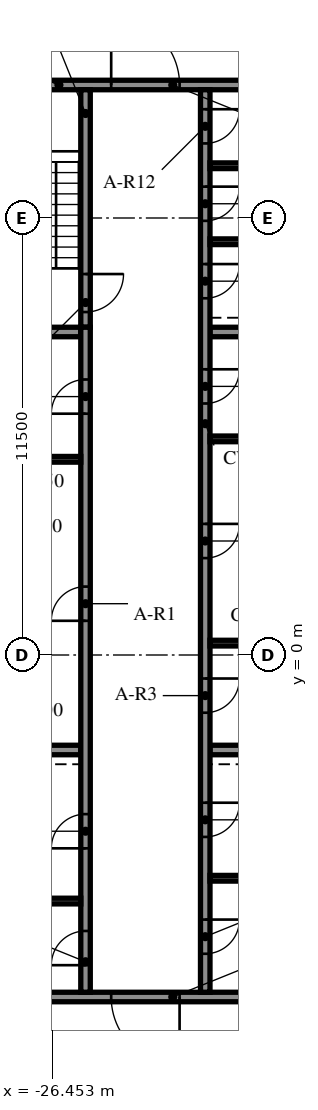
"""IFC4 building model, lengths in metres.
Left out: names, types, materials, properties, quantities, classifications, styles, units other than length and angle.
Written with IfcOpenShell. Run it as: python <this file> out.ifc"""

import sys

from ifc_helpers import new_model, si_unit, direction, frame, frame_2d, origin, place, context, subcontext, project, spatial, rectangle, extrude, element, fill, save


model = new_model("IFC4")
c1 = context("Model", 3, precision=1e-05, world=origin(), true_north=direction((0.0, 1.0)))
c2 = subcontext(c1, "Body", "Model", "MODEL_VIEW")
j1 = project(units=[si_unit("LENGTHUNIT", "METRE"), si_unit("PLANEANGLEUNIT", "RADIAN")], contexts=[c1])
p1 = place(None, origin())
s1 = spatial("IfcSite", under=j1, at=p1, CompositionType="ELEMENT")
p2 = place(p1, origin())
s2 = spatial("IfcBuilding", under=s1, at=p2, CompositionType="ELEMENT")
p3 = place(p2, frame((0.0, 0.0, 182.0)))
s3 = spatial("IfcBuildingStorey", under=s2, at=p3, CompositionType="ELEMENT", Elevation=182.0)
p4 = place(p3, frame((-19.45, -9.0, 0.0), z_axis=(0.0, 0.0, 1.0), x_axis=(-1.0, 0.0, 0.0)))
e1 = element("IfcWall", 1, at=p4, inside=s3, PredefinedType="SOLIDWALL", context=c2, shape_type="SweptSolid", body=[
    extrude(rectangle(XDim=9.1, YDim=0.25, at=frame_2d((4.55, 0.0))), origin(), (0.0, 0.0, 1.0), 3.46),
])
p5 = place(p4, frame((3.65, 0.0, 0.0)))
e2 = element("IfcOpeningElement", 2, at=p5, cuts=e1, PredefinedType="OPENING", context=c2, shape_type="SweptSolid", body=[
    extrude(rectangle(XDim=1.8, YDim=2.1, at=frame_2d((0.9, 1.05))), frame((0.0, 0.135, 0.0), z_axis=(0.0, -1.0, 0.0), x_axis=(1.0, 0.0, 0.0)), (0.0, 0.0, 1.0), 0.27),
])
p6 = place(p3, frame((-28.55, 15.0, 0.0), z_axis=(0.0, 0.0, 1.0), x_axis=(1.0, 0.0, 0.0)))
e3 = element("IfcWall", 3, at=p6, inside=s3, PredefinedType="SOLIDWALL", context=c2, shape_type="SweptSolid", body=[
    extrude(rectangle(XDim=9.1, YDim=0.25, at=frame_2d((4.55, 0.0))), origin(), (0.0, 0.0, 1.0), 3.46),
])
p7 = place(p6, frame((3.65, 0.0, 0.0)))
e4 = element("IfcOpeningElement", 4, at=p7, cuts=e3, PredefinedType="OPENING", context=c2, shape_type="SweptSolid", body=[
    extrude(rectangle(XDim=1.8, YDim=2.1, at=frame_2d((0.9, 1.05))), frame((0.0, 0.135, 0.0), z_axis=(0.0, -1.0, 0.0), x_axis=(1.0, 0.0, 0.0)), (0.0, 0.0, 1.0), 0.27),
])
p8 = place(p3, frame((-25.575, -8.875, 0.0), z_axis=(0.0, 0.0, 1.0), x_axis=(0.0, 1.0, 0.0)))
e5 = element("IfcWall", 5, at=p8, inside=s3, PredefinedType="SOLIDWALL", context=c2, shape_type="SweptSolid", body=[
    extrude(rectangle(XDim=17.5, YDim=0.25, at=frame_2d((8.75, 0.0))), origin(), (0.0, 0.0, 1.0), 3.46),
])
p9 = place(p8, frame((9.775, 0.0, 0.0)))
e6 = element("IfcOpeningElement", 6, at=p9, cuts=e5, PredefinedType="OPENING", context=c2, shape_type="SweptSolid", body=[
    extrude(rectangle(XDim=0.9, YDim=2.1, at=frame_2d((0.45, 1.05))), frame((0.0, 0.135, 0.0), z_axis=(0.0, -1.0, 0.0), x_axis=(1.0, 0.0, 0.0)), (0.0, 0.0, 1.0), 0.27),
])
p10 = place(p8, frame((15.225, 0.0, 0.0)))
e7 = element("IfcOpeningElement", 7, at=p10, cuts=e5, PredefinedType="OPENING", context=c2, shape_type="SweptSolid", body=[
    extrude(rectangle(XDim=0.9, YDim=2.1, at=frame_2d((0.45, 1.05))), frame((0.0, 0.135, 0.0), z_axis=(0.0, -1.0, 0.0), x_axis=(1.0, 0.0, 0.0)), (0.0, 0.0, 1.0), 0.27),
])
p11 = place(p8, frame((0.712, 0.0, 0.0)))
e8 = element("IfcOpeningElement", 8, at=p11, cuts=e5, PredefinedType="OPENING", context=c2, shape_type="SweptSolid", body=[
    extrude(rectangle(XDim=0.9, YDim=2.1, at=frame_2d((0.45, 1.05))), frame((0.0, 0.135, 0.0), z_axis=(0.0, -1.0, 0.0), x_axis=(1.0, 0.0, 0.0)), (0.0, 0.0, 1.0), 0.27),
])
p12 = place(p8, frame((3.788, 0.0, 0.0)))
e9 = element("IfcOpeningElement", 9, at=p12, cuts=e5, PredefinedType="OPENING", context=c2, shape_type="SweptSolid", body=[
    extrude(rectangle(XDim=0.9, YDim=2.1, at=frame_2d((0.45, 1.05))), frame((0.0, 0.135, 0.0), z_axis=(0.0, -1.0, 0.0), x_axis=(1.0, 0.0, 0.0)), (0.0, 0.0, 1.0), 0.27),
])
p13 = place(p3, frame((-25.575, 14.875, 0.0), z_axis=(0.0, 0.0, 1.0), x_axis=(0.0, -1.0, 0.0)))
e10 = element("IfcWall", 10, at=p13, inside=s3, PredefinedType="SOLIDWALL", context=c2, shape_type="SweptSolid", body=[
    extrude(rectangle(XDim=6.25, YDim=0.25, at=frame_2d((3.125, 0.0))), origin(), (0.0, 0.0, 1.0), 3.46),
])
p14 = place(p13, frame((4.85, 0.0, 0.0)))
e11 = element("IfcOpeningElement", 11, at=p14, cuts=e10, PredefinedType="OPENING", context=c2, shape_type="SweptSolid", body=[
    extrude(rectangle(XDim=1.0, YDim=2.1, at=frame_2d((0.5, 1.05))), frame((0.0, 0.135, 0.0), z_axis=(0.0, -1.0, 0.0), x_axis=(1.0, 0.0, 0.0)), (0.0, 0.0, 1.0), 0.27),
])
p15 = place(p3, frame((-22.425, 14.875, 0.0), z_axis=(0.0, 0.0, 1.0), x_axis=(0.0, -1.0, 0.0)))
e12 = element("IfcWall", 12, at=p15, inside=s3, PredefinedType="SOLIDWALL", context=c2, shape_type="SweptSolid", body=[
    extrude(rectangle(XDim=23.75, YDim=0.25, at=frame_2d((11.875, 0.0))), origin(), (0.0, 0.0, 1.0), 3.46),
])
p16 = place(p15, frame((15.494, 0.0, 0.0)))
e13 = element("IfcOpeningElement", 13, at=p16, cuts=e12, PredefinedType="OPENING", context=c2, shape_type="SweptSolid", body=[
    extrude(rectangle(XDim=0.9, YDim=2.1, at=frame_2d((0.45, 1.05))), frame((0.0, 0.135, 0.0), z_axis=(0.0, -1.0, 0.0), x_axis=(1.0, 0.0, 0.0)), (0.0, 0.0, 1.0), 0.27),
])
p17 = place(p15, frame((11.425, 0.0, 0.0)))
e14 = element("IfcOpeningElement", 14, at=p17, cuts=e12, PredefinedType="OPENING", context=c2, shape_type="SweptSolid", body=[
    extrude(rectangle(XDim=0.9, YDim=2.1, at=frame_2d((0.45, 1.05))), frame((0.0, 0.135, 0.0), z_axis=(0.0, -1.0, 0.0), x_axis=(1.0, 0.0, 0.0)), (0.0, 0.0, 1.0), 0.27),
])
p18 = place(p15, frame((7.356, 0.0, 0.0)))
e15 = element("IfcOpeningElement", 15, at=p18, cuts=e12, PredefinedType="OPENING", context=c2, shape_type="SweptSolid", body=[
    extrude(rectangle(XDim=0.9, YDim=2.1, at=frame_2d((0.45, 1.05))), frame((0.0, 0.135, 0.0), z_axis=(0.0, -1.0, 0.0), x_axis=(1.0, 0.0, 0.0)), (0.0, 0.0, 1.0), 0.27),
])
p19 = place(p15, frame((21.837, 0.0, 0.0)))
e16 = element("IfcOpeningElement", 16, at=p19, cuts=e12, PredefinedType="OPENING", context=c2, shape_type="SweptSolid", body=[
    extrude(rectangle(XDim=0.9, YDim=2.1, at=frame_2d((0.45, 1.05))), frame((0.0, 0.135, 0.0), z_axis=(0.0, -1.0, 0.0), x_axis=(1.0, 0.0, 0.0)), (0.0, 0.0, 1.0), 0.27),
])
p20 = place(p15, frame((18.762, 0.0, 0.0)))
e17 = element("IfcOpeningElement", 17, at=p20, cuts=e12, PredefinedType="OPENING", context=c2, shape_type="SweptSolid", body=[
    extrude(rectangle(XDim=0.9, YDim=2.1, at=frame_2d((0.45, 1.05))), frame((0.0, 0.135, 0.0), z_axis=(0.0, -1.0, 0.0), x_axis=(1.0, 0.0, 0.0)), (0.0, 0.0, 1.0), 0.27),
])
p21 = place(p15, frame((4.587, 0.0, 0.0)))
e18 = element("IfcOpeningElement", 18, at=p21, cuts=e12, PredefinedType="OPENING", context=c2, shape_type="SweptSolid", body=[
    extrude(rectangle(XDim=0.9, YDim=2.1, at=frame_2d((0.45, 1.05))), frame((0.0, 0.135, 0.0), z_axis=(0.0, -1.0, 0.0), x_axis=(1.0, 0.0, 0.0)), (0.0, 0.0, 1.0), 0.27),
])
p22 = place(p15, frame((2.55, 0.0, 0.0)))
e19 = element("IfcOpeningElement", 19, at=p22, cuts=e12, PredefinedType="OPENING", context=c2, shape_type="SweptSolid", body=[
    extrude(rectangle(XDim=0.9, YDim=2.1, at=frame_2d((0.45, 1.05))), frame((0.0, 0.135, 0.0), z_axis=(0.0, -1.0, 0.0), x_axis=(1.0, 0.0, 0.0)), (0.0, 0.0, 1.0), 0.27),
])
p23 = place(p15, frame((0.512, 0.0, 0.0)))
e20 = element("IfcOpeningElement", 20, at=p23, cuts=e12, PredefinedType="OPENING", context=c2, shape_type="SweptSolid", body=[
    extrude(rectangle(XDim=0.9, YDim=2.1, at=frame_2d((0.45, 1.05))), frame((0.0, 0.135, 0.0), z_axis=(0.0, -1.0, 0.0), x_axis=(1.0, 0.0, 0.0)), (0.0, 0.0, 1.0), 0.27),
])
for number, where, z_axis, x_axis in (
    (21, (-28.55, -2.5, 0.0), (0.0, 0.0, 1.0), (1.0, 0.0, 0.0)),
    (22, (-28.55, 8.5, 0.0), (0.0, 0.0, 1.0), (1.0, 0.0, 0.0)),
    (23, (-22.3, -2.5, 0.0), (0.0, 0.0, 1.0), (1.0, 0.0, 0.0)),
    (24, (-22.3, 8.5, 0.0), (0.0, 0.0, 1.0), (1.0, 0.0, 0.0)),
):
    element("IfcWall", number, at=place(p3, frame(where, z_axis=z_axis, x_axis=x_axis)), inside=s3, PredefinedType="SOLIDWALL", context=c2, shape_type="SweptSolid", body=[
        extrude(rectangle(XDim=2.85, YDim=0.25, at=frame_2d((1.425, 0.0))), origin(), (0.0, 0.0, 1.0), 3.46),
    ])
for number, where, z_axis, x_axis in (
    (25, (-28.55, 5.15, 0.0), (0.0, 0.0, 1.0), (1.0, 0.0, 0.0)),
    (26, (-22.3, 0.312, 0.0), (0.0, 0.0, 1.0), (1.0, 0.0, 0.0)),
    (27, (-22.3, 5.688, 0.0), (0.0, 0.0, 1.0), (1.0, 0.0, 0.0)),
    (28, (-28.55, -6.475, 0.0), (0.0, 0.0, 1.0), (1.0, 0.0, 0.0)),
    (29, (-22.3, -5.875, 0.0), (0.0, 0.0, 1.0), (1.0, 0.0, 0.0)),
    (30, (-22.3, 10.875, 0.0), (0.0, 0.0, 1.0), (1.0, 0.0, 0.0)),
    (31, (-22.3, 12.875, 0.0), (0.0, 0.0, 1.0), (1.0, 0.0, 0.0)),
):
    element("IfcWall", number, at=place(p3, frame(where, z_axis=z_axis, x_axis=x_axis)), inside=s3, PredefinedType="PARTITIONING", context=c2, shape_type="SweptSolid", body=[
        extrude(rectangle(XDim=2.85, YDim=0.15, at=frame_2d((1.425, 0.0))), origin(), (0.0, 0.0, 1.0), 3.46),
    ])
p24 = place(p5, origin())
e32 = element("IfcDoor", 32, at=p24, inside=s3, OperationType="DOUBLE_DOOR_SINGLE_SWING", PredefinedType="DOOR", context=c2, shape_type="SweptSolid", body=[
    extrude(rectangle(XDim=1.8, YDim=2.1, at=frame_2d((0.9, 1.05))), frame((0.0, 0.025, 0.0), z_axis=(0.0, -1.0, 0.0), x_axis=(1.0, 0.0, 0.0)), (0.0, 0.0, 1.0), 0.05),
])
fill(e2, e32)
p25 = place(p7, origin())
e33 = element("IfcDoor", 33, at=p25, inside=s3, OperationType="DOUBLE_DOOR_SINGLE_SWING", PredefinedType="DOOR", context=c2, shape_type="SweptSolid", body=[
    extrude(rectangle(XDim=1.8, YDim=2.1, at=frame_2d((0.9, 1.05))), frame((0.0, 0.025, 0.0), z_axis=(0.0, -1.0, 0.0), x_axis=(1.0, 0.0, 0.0)), (0.0, 0.0, 1.0), 0.05),
])
fill(e4, e33)
p26 = place(p9, origin())
e34 = element("IfcDoor", 34, at=p26, inside=s3, OperationType="SINGLE_SWING_LEFT", PredefinedType="DOOR", context=c2, shape_type="SweptSolid", body=[
    extrude(rectangle(XDim=0.9, YDim=2.1, at=frame_2d((0.45, 1.05))), frame((0.0, 0.025, 0.0), z_axis=(0.0, -1.0, 0.0), x_axis=(1.0, 0.0, 0.0)), (0.0, 0.0, 1.0), 0.05),
])
fill(e6, e34)
p27 = place(p10, origin())
e35 = element("IfcDoor", 35, at=p27, inside=s3, OperationType="SINGLE_SWING_RIGHT", PredefinedType="DOOR", context=c2, shape_type="SweptSolid", body=[
    extrude(rectangle(XDim=0.9, YDim=2.1, at=frame_2d((0.45, 1.05))), frame((0.0, 0.025, 0.0), z_axis=(0.0, -1.0, 0.0), x_axis=(1.0, 0.0, 0.0)), (0.0, 0.0, 1.0), 0.05),
])
fill(e7, e35)
p28 = place(p16, origin())
e36 = element("IfcDoor", 36, at=p28, inside=s3, OperationType="SINGLE_SWING_LEFT", PredefinedType="DOOR", context=c2, shape_type="SweptSolid", body=[
    extrude(rectangle(XDim=0.9, YDim=2.1, at=frame_2d((0.45, 1.05))), frame((0.0, 0.025, 0.0), z_axis=(0.0, -1.0, 0.0), x_axis=(1.0, 0.0, 0.0)), (0.0, 0.0, 1.0), 0.05),
])
fill(e13, e36)
p29 = place(p17, origin())
e37 = element("IfcDoor", 37, at=p29, inside=s3, OperationType="SINGLE_SWING_RIGHT", PredefinedType="DOOR", context=c2, shape_type="SweptSolid", body=[
    extrude(rectangle(XDim=0.9, YDim=2.1, at=frame_2d((0.45, 1.05))), frame((0.0, 0.025, 0.0), z_axis=(0.0, -1.0, 0.0), x_axis=(1.0, 0.0, 0.0)), (0.0, 0.0, 1.0), 0.05),
])
fill(e14, e37)
p30 = place(p18, origin())
e38 = element("IfcDoor", 38, at=p30, inside=s3, OperationType="SINGLE_SWING_LEFT", PredefinedType="DOOR", context=c2, shape_type="SweptSolid", body=[
    extrude(rectangle(XDim=0.9, YDim=2.1, at=frame_2d((0.45, 1.05))), frame((0.0, 0.025, 0.0), z_axis=(0.0, -1.0, 0.0), x_axis=(1.0, 0.0, 0.0)), (0.0, 0.0, 1.0), 0.05),
])
fill(e15, e38)
p31 = place(p11, origin())
e39 = element("IfcDoor", 39, at=p31, inside=s3, OperationType="SINGLE_SWING_RIGHT", PredefinedType="DOOR", context=c2, shape_type="SweptSolid", body=[
    extrude(rectangle(XDim=0.9, YDim=2.1, at=frame_2d((0.45, 1.05))), frame((0.0, 0.025, 0.0), z_axis=(0.0, -1.0, 0.0), x_axis=(1.0, 0.0, 0.0)), (0.0, 0.0, 1.0), 0.05),
])
fill(e8, e39)
p32 = place(p12, origin())
e40 = element("IfcDoor", 40, at=p32, inside=s3, OperationType="SINGLE_SWING_LEFT", PredefinedType="DOOR", context=c2, shape_type="SweptSolid", body=[
    extrude(rectangle(XDim=0.9, YDim=2.1, at=frame_2d((0.45, 1.05))), frame((0.0, 0.025, 0.0), z_axis=(0.0, -1.0, 0.0), x_axis=(1.0, 0.0, 0.0)), (0.0, 0.0, 1.0), 0.05),
])
fill(e9, e40)
p33 = place(p19, origin())
e41 = element("IfcDoor", 41, at=p33, inside=s3, OperationType="SINGLE_SWING_RIGHT", PredefinedType="DOOR", context=c2, shape_type="SweptSolid", body=[
    extrude(rectangle(XDim=0.9, YDim=2.1, at=frame_2d((0.45, 1.05))), frame((0.0, 0.025, 0.0), z_axis=(0.0, -1.0, 0.0), x_axis=(1.0, 0.0, 0.0)), (0.0, 0.0, 1.0), 0.05),
])
fill(e16, e41)
p34 = place(p20, origin())
e42 = element("IfcDoor", 42, at=p34, inside=s3, OperationType="SINGLE_SWING_LEFT", PredefinedType="DOOR", context=c2, shape_type="SweptSolid", body=[
    extrude(rectangle(XDim=0.9, YDim=2.1, at=frame_2d((0.45, 1.05))), frame((0.0, 0.025, 0.0), z_axis=(0.0, -1.0, 0.0), x_axis=(1.0, 0.0, 0.0)), (0.0, 0.0, 1.0), 0.05),
])
fill(e17, e42)
p35 = place(p21, origin())
e43 = element("IfcDoor", 43, at=p35, inside=s3, OperationType="SINGLE_SWING_RIGHT", PredefinedType="DOOR", context=c2, shape_type="SweptSolid", body=[
    extrude(rectangle(XDim=0.9, YDim=2.1, at=frame_2d((0.45, 1.05))), frame((0.0, 0.025, 0.0), z_axis=(0.0, -1.0, 0.0), x_axis=(1.0, 0.0, 0.0)), (0.0, 0.0, 1.0), 0.05),
])
fill(e18, e43)
p36 = place(p22, origin())
e44 = element("IfcDoor", 44, at=p36, inside=s3, OperationType="SINGLE_SWING_LEFT", PredefinedType="DOOR", context=c2, shape_type="SweptSolid", body=[
    extrude(rectangle(XDim=0.9, YDim=2.1, at=frame_2d((0.45, 1.05))), frame((0.0, 0.025, 0.0), z_axis=(0.0, -1.0, 0.0), x_axis=(1.0, 0.0, 0.0)), (0.0, 0.0, 1.0), 0.05),
])
fill(e19, e44)
p37 = place(p23, origin())
e45 = element("IfcDoor", 45, at=p37, inside=s3, OperationType="SINGLE_SWING_RIGHT", PredefinedType="DOOR", context=c2, shape_type="SweptSolid", body=[
    extrude(rectangle(XDim=0.9, YDim=2.1, at=frame_2d((0.45, 1.05))), frame((0.0, 0.025, 0.0), z_axis=(0.0, -1.0, 0.0), x_axis=(1.0, 0.0, 0.0)), (0.0, 0.0, 1.0), 0.05),
])
fill(e20, e45)
p38 = place(p14, origin())
e46 = element("IfcDoor", 46, at=p38, inside=s3, OperationType="SINGLE_SWING_LEFT", PredefinedType="DOOR", context=c2, shape_type="SweptSolid", body=[
    extrude(rectangle(XDim=1.0, YDim=2.1, at=frame_2d((0.5, 1.05))), frame((0.0, 0.025, 0.0), z_axis=(0.0, -1.0, 0.0), x_axis=(1.0, 0.0, 0.0)), (0.0, 0.0, 1.0), 0.05),
])
fill(e11, e46)
save(model, sys.argv[1])
